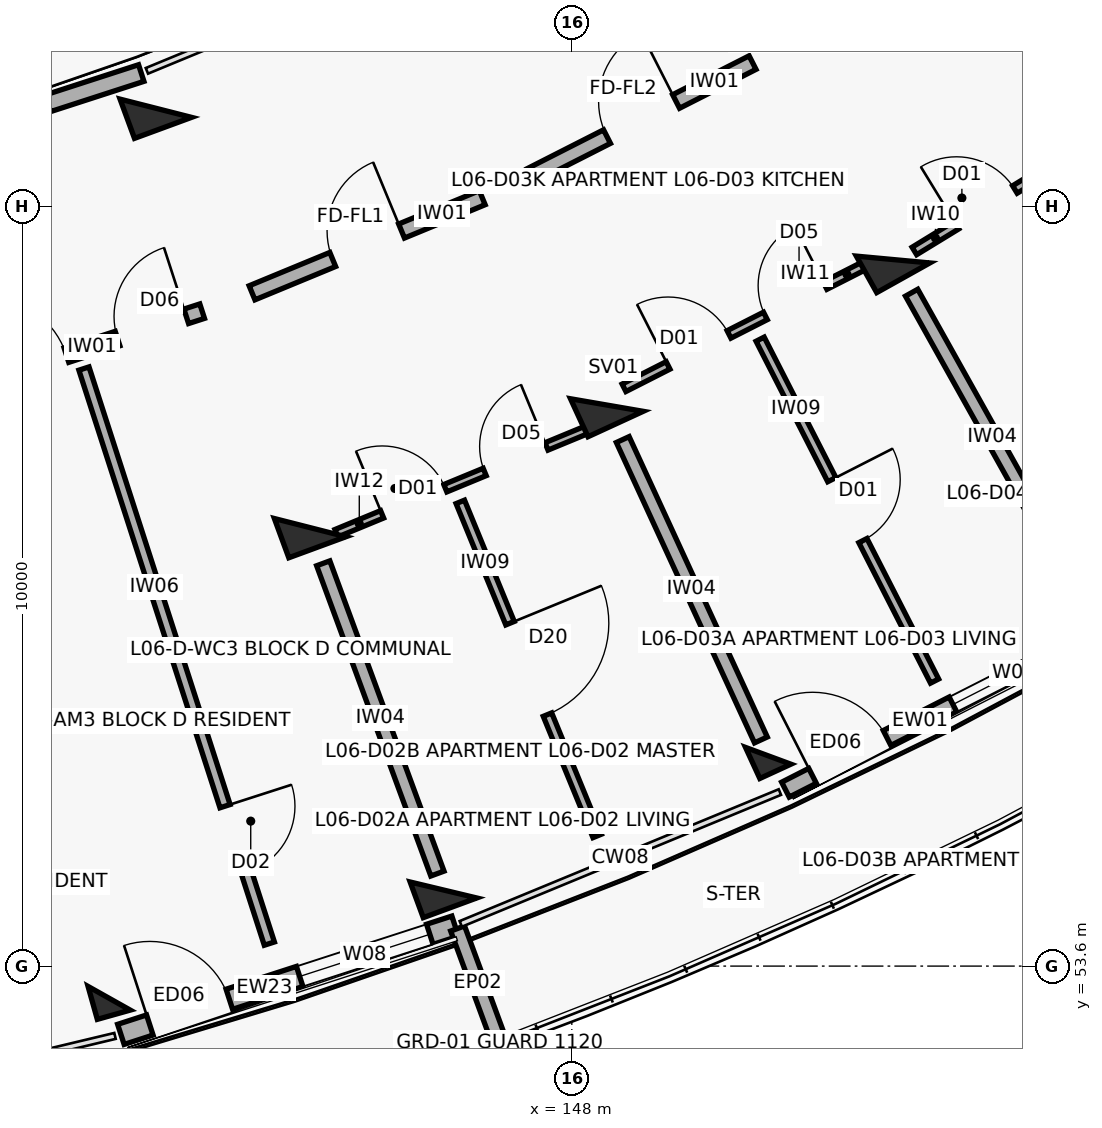
"""IFC4 building model, lengths in metres.
Left out: names, types, materials, properties, quantities, classifications, styles, units other than length and angle.
Written with IfcOpenShell. Run it as: python <this file> out.ifc"""

import sys

from ifc_helpers import new_model, si_unit, direction, frame, frame_2d, origin, origin_2d, place, context, subcontext, project, spatial, rectangle, extrude, element, fill, save


model = new_model("IFC4")
c1 = context("Model", 3, precision=1e-05, world=origin(), true_north=direction((0.0, 1.0)))
c2 = subcontext(c1, "Body", "Model", "MODEL_VIEW")
j1 = project(units=[si_unit("LENGTHUNIT", "METRE"), si_unit("PLANEANGLEUNIT", "RADIAN")], contexts=[c1])
p1 = place(None, origin())
s1 = spatial("IfcSite", under=j1, at=p1, CompositionType="ELEMENT")
p2 = place(p1, origin())
s2 = spatial("IfcBuilding", under=s1, at=p2, CompositionType="ELEMENT")
p3 = place(p2, frame((0.0, 0.0, 20.5)))
s3 = spatial("IfcBuildingStorey", under=s2, at=p3, CompositionType="ELEMENT", Elevation=20.5)
p4 = place(p3, frame((141.913, 53.177, 0.0), z_axis=(0.0, 0.0, 1.0), x_axis=(0.270600445976, -0.962691746426, 0.0)))
e1 = element("IfcColumn", 1, at=p4, inside=s3, PredefinedType="COLUMN", context=c2, shape_type="SweptSolid", body=[
    extrude(rectangle(XDim=0.45, YDim=0.45, at=origin_2d()), origin(), (0.0, 0.0, 1.0), 3.1),
])
for number, where, z_axis, x_axis in (
    (2, (142.527, 64.887, 0.0), (0.0, 0.0, 1.0), (0.345, -0.938, 0.0)),
    (3, (144.557, 59.369, 0.0), (0.0, 0.0, 1.0), (0.345, -0.938, 0.0)),
):
    element("IfcColumn", number, at=place(p3, frame(where, z_axis=z_axis, x_axis=x_axis)), inside=s3, PredefinedType="COLUMN", context=c2, shape_type="SweptSolid", body=[
        extrude(rectangle(XDim=0.55, YDim=0.8, at=origin_2d()), origin(), (0.0, 0.0, 1.0), 3.1),
    ])
p5 = place(p3, frame((146.311, 54.602, 0.0), z_axis=(0.0, 0.0, 1.0), x_axis=(0.345298198999, -0.93849302276, 0.0)))
e4 = element("IfcColumn", 4, at=p5, inside=s3, PredefinedType="COLUMN", context=c2, shape_type="SweptSolid", body=[
    extrude(rectangle(XDim=0.5, YDim=0.75, at=origin_2d()), origin(), (0.0, 0.0, 1.0), 3.1),
])
p6 = place(p3, frame((148.461, 60.982, 0.0), z_axis=(0.0, 0.0, 1.0), x_axis=(0.417867073801, -0.908508177527, 0.0)))
e5 = element("IfcColumn", 5, at=p6, inside=s3, PredefinedType="COLUMN", context=c2, shape_type="SweptSolid", body=[
    extrude(rectangle(XDim=0.55, YDim=0.8, at=origin_2d()), origin(), (0.0, 0.0, 1.0), 3.1),
])
p7 = place(p3, frame((150.584, 56.367, 0.0), z_axis=(0.0, 0.0, 1.0), x_axis=(0.417867073801, -0.908508177527, 0.0)))
e6 = element("IfcColumn", 6, at=p7, inside=s3, PredefinedType="COLUMN", context=c2, shape_type="SweptSolid", body=[
    extrude(rectangle(XDim=0.45, YDim=0.45, at=origin_2d()), origin(), (0.0, 0.0, 1.0), 3.1),
])
p8 = place(p3, frame((152.227, 62.897, 0.0), z_axis=(0.0, 0.0, 1.0), x_axis=(0.487859659139, -0.87292207727, 0.0)))
e7 = element("IfcColumn", 7, at=p8, inside=s3, PredefinedType="COLUMN", context=c2, shape_type="SweptSolid", body=[
    extrude(rectangle(XDim=0.55, YDim=0.8, at=origin_2d()), origin(), (0.0, 0.0, 1.0), 3.1),
])
p9 = place(p3, frame((142.067, 52.701, 0.0), z_axis=(0.0, 0.0, 1.0), x_axis=(0.951311584867, 0.308230868826, 0.0)))
e8 = element("IfcWall", 8, at=p9, inside=s3, PredefinedType="SOLIDWALL", context=c2, shape_type="SweptSolid", body=[
    extrude(rectangle(XDim=4.623, YDim=0.278, at=frame_2d((2.311, 0.0))), origin(), (0.0, 0.0, 1.0), 2.25),
])
p10 = place(p9, frame((0.4, 0.0, 0.0)))
e9 = element("IfcOpeningElement", 9, at=p10, cuts=e8, PredefinedType="OPENING", context=c2, shape_type="SweptSolid", body=[
    extrude(rectangle(XDim=1.1, YDim=2.15, at=frame_2d((0.55, 1.075))), frame((0.0, 0.149, 0.0), z_axis=(0.0, -1.0, 0.0), x_axis=(1.0, 0.0, 0.0)), (0.0, 0.0, 1.0), 0.298),
])
p11 = place(p9, frame((2.472, 0.0, 0.35)))
e10 = element("IfcOpeningElement", 10, at=p11, cuts=e8, PredefinedType="OPENING", context=c2, shape_type="SweptSolid", body=[
    extrude(rectangle(XDim=1.8, YDim=1.65, at=frame_2d((0.9, 0.825))), frame((0.0, 0.149, 0.0), z_axis=(0.0, -1.0, 0.0), x_axis=(1.0, 0.0, 0.0)), (0.0, 0.0, 1.0), 0.298),
])
p12 = place(p3, frame((138.831, 64.215, 0.0), z_axis=(0.0, 0.0, 1.0), x_axis=(0.951320548791, 0.308203201552, 0.0)))
e11 = element("IfcWall", 11, at=p12, inside=s3, PredefinedType="SOLIDWALL", context=c2, shape_type="SweptSolid", body=[
    extrude(rectangle(XDim=3.683, YDim=0.23, at=frame_2d((1.842, 0.0))), origin(), (0.0, 0.0, 1.0), 2.25),
])
p13 = place(p12, frame((1.292, 0.0, 0.0)))
e12 = element("IfcOpeningElement", 12, at=p13, cuts=e11, PredefinedType="OPENING", context=c2, shape_type="SweptSolid", body=[
    extrude(rectangle(XDim=1.1, YDim=2.15, at=frame_2d((0.55, 1.075))), frame((0.0, 0.125, 0.0), z_axis=(0.0, -1.0, 0.0), x_axis=(1.0, 0.0, 0.0)), (0.0, 0.0, 1.0), 0.25),
])
p14 = place(p3, frame((146.498, 54.095, 0.0), z_axis=(0.0, 0.0, 1.0), x_axis=(0.345328180406, -0.938481991206, 0.0)))
e13 = element("IfcWall", 13, at=p14, inside=s3, PredefinedType="PARAPET", context=c2, shape_type="SweptSolid", body=[
    extrude(rectangle(XDim=1.53, YDim=0.195, at=frame_2d((0.765, 0.0))), origin(), (0.0, 0.0, 1.0), 2.25),
])
p15 = place(p3, frame((150.811, 55.922, 0.0), z_axis=(0.0, 0.0, 1.0), x_axis=(0.891407190547, 0.453203288428, 0.0)))
e14 = element("IfcWall", 14, at=p15, inside=s3, PredefinedType="SOLIDWALL", context=c2, shape_type="SweptSolid", body=[
    extrude(rectangle(XDim=4.623, YDim=0.22, at=frame_2d((2.311, 0.0))), origin(), (0.0, 0.0, 1.0), 2.25),
])
p16 = place(p15, frame((0.4, 0.0, 0.0)))
e15 = element("IfcOpeningElement", 15, at=p16, cuts=e14, PredefinedType="OPENING", context=c2, shape_type="SweptSolid", body=[
    extrude(rectangle(XDim=1.1, YDim=2.15, at=frame_2d((0.55, 1.075))), frame((0.0, 0.12, 0.0), z_axis=(0.0, -1.0, 0.0), x_axis=(1.0, 0.0, 0.0)), (0.0, 0.0, 1.0), 0.24),
])
p17 = place(p15, frame((2.472, 0.0, 0.35)))
e16 = element("IfcOpeningElement", 16, at=p17, cuts=e14, PredefinedType="OPENING", context=c2, shape_type="SweptSolid", body=[
    extrude(rectangle(XDim=1.8, YDim=1.65, at=frame_2d((0.9, 0.825))), frame((0.0, 0.12, 0.0), z_axis=(0.0, -1.0, 0.0), x_axis=(1.0, 0.0, 0.0)), (0.0, 0.0, 1.0), 0.24),
])
p18 = place(p3, frame((140.019, 61.208, 0.0), z_axis=(0.0, 0.0, 1.0), x_axis=(0.951323803878, 0.308193154005, 0.0)))
e17 = element("IfcWall", 17, at=p18, inside=s3, PredefinedType="SOLIDWALL", context=c2, shape_type="SweptSolid", body=[
    extrude(rectangle(XDim=3.277, YDim=0.2, at=frame_2d((1.639, 0.0))), origin(), (0.0, 0.0, 1.0), 2.08),
])
p19 = place(p18, frame((0.28, 0.0, 0.0)))
e18 = element("IfcOpeningElement", 18, at=p19, cuts=e17, PredefinedType="OPENING", context=c2, shape_type="SweptSolid", body=[
    extrude(rectangle(XDim=1.12, YDim=2.15, at=frame_2d((0.56, 1.075))), frame((0.0, 0.11, 0.0), z_axis=(0.0, -1.0, 0.0), x_axis=(1.0, 0.0, 0.0)), (0.0, 0.0, 1.0), 0.22),
])
p20 = place(p18, frame((2.107, 0.0, 0.0)))
e19 = element("IfcOpeningElement", 19, at=p20, cuts=e17, PredefinedType="OPENING", context=c2, shape_type="SweptSolid", body=[
    extrude(rectangle(XDim=0.95, YDim=2.1, at=frame_2d((0.475, 1.05))), frame((0.0, 0.11, 0.0), z_axis=(0.0, -1.0, 0.0), x_axis=(1.0, 0.0, 0.0)), (0.0, 0.0, 1.0), 0.22),
])
p21 = place(p3, frame((141.581, 61.462, 0.0), z_axis=(0.0, 0.0, 1.0), x_axis=(0.306824216212, -0.951766200464, 0.0)))
e20 = element("IfcWall", 20, at=p21, inside=s3, PredefinedType="PARTITIONING", context=c2, shape_type="SweptSolid", body=[
    extrude(rectangle(XDim=7.95, YDim=0.14, at=frame_2d((3.975, 0.0))), origin(), (0.0, 0.0, 1.0), 2.08),
])
p22 = place(p21, frame((6.05, 0.0, 0.0)))
e21 = element("IfcOpeningElement", 21, at=p22, cuts=e20, PredefinedType="OPENING", context=c2, shape_type="SweptSolid", body=[
    extrude(rectangle(XDim=0.92, YDim=2.1, at=frame_2d((0.46, 1.05))), frame((0.0, 0.08, 0.0), z_axis=(0.0, -1.0, 0.0), x_axis=(1.0, 0.0, 0.0)), (0.0, 0.0, 1.0), 0.16),
])
p23 = place(p3, frame((143.793, 62.459, 0.0), z_axis=(0.0, 0.0, 1.0), x_axis=(0.924214561665, 0.381873596896, 0.0)))
e22 = element("IfcWall", 22, at=p23, inside=s3, PredefinedType="SOLIDWALL", context=c2, shape_type="SweptSolid", body=[
    extrude(rectangle(XDim=3.277, YDim=0.2, at=frame_2d((1.639, 0.0))), origin(), (0.0, 0.0, 1.0), 2.08),
])
p24 = place(p23, frame((1.148, 0.0, 0.0)))
e23 = element("IfcOpeningElement", 23, at=p24, cuts=e22, PredefinedType="OPENING", context=c2, shape_type="SweptSolid", body=[
    extrude(rectangle(XDim=0.98, YDim=2.15, at=frame_2d((0.49, 1.075))), frame((0.0, 0.11, 0.0), z_axis=(0.0, -1.0, 0.0), x_axis=(1.0, 0.0, 0.0)), (0.0, 0.0, 1.0), 0.22),
])
p25 = place(p3, frame((144.903, 59.296, 0.0), z_axis=(0.0, 0.0, 1.0), x_axis=(0.924207914011, 0.381889685223, 0.0)))
e24 = element("IfcWall", 24, at=p25, inside=s3, PredefinedType="PARTITIONING", context=c2, shape_type="SweptSolid", body=[
    extrude(rectangle(XDim=3.64, YDim=0.105, at=frame_2d((1.82, 0.0))), origin(), (0.0, 0.0, 1.0), 2.08),
])
p26 = place(p25, frame((0.65, 0.0, 0.0)))
e25 = element("IfcOpeningElement", 25, at=p26, cuts=e24, PredefinedType="OPENING", context=c2, shape_type="SweptSolid", body=[
    extrude(rectangle(XDim=0.9, YDim=2.1, at=frame_2d((0.45, 1.05))), frame((0.0, 0.062, 0.0), z_axis=(0.0, -1.0, 0.0), x_axis=(1.0, 0.0, 0.0)), (0.0, 0.0, 1.0), 0.125),
])
p27 = place(p25, frame((2.11, 0.0, 0.0)))
e26 = element("IfcOpeningElement", 26, at=p27, cuts=e24, PredefinedType="OPENING", context=c2, shape_type="SweptSolid", body=[
    extrude(rectangle(XDim=0.88, YDim=2.1, at=frame_2d((0.44, 1.05))), frame((0.0, 0.062, 0.0), z_axis=(0.0, -1.0, 0.0), x_axis=(1.0, 0.0, 0.0)), (0.0, 0.0, 1.0), 0.125),
])
p28 = place(p3, frame((146.533, 59.708, 0.0), z_axis=(0.0, 0.0, 1.0), x_axis=(0.379167145653, -0.925328198888, 0.0)))
e27 = element("IfcWall", 27, at=p28, inside=s3, PredefinedType="PARTITIONING", context=c2, shape_type="SweptSolid", body=[
    extrude(rectangle(XDim=4.75, YDim=0.12, at=frame_2d((2.375, 0.0))), origin(), (0.0, 0.0, 1.0), 2.08),
])
p29 = place(p28, frame((1.725, 0.0, 0.0)))
e28 = element("IfcOpeningElement", 28, at=p29, cuts=e27, PredefinedType="OPENING", context=c2, shape_type="SweptSolid", body=[
    extrude(rectangle(XDim=1.3, YDim=2.1, at=frame_2d((0.65, 1.05))), frame((0.0, 0.07, 0.0), z_axis=(0.0, -1.0, 0.0), x_axis=(1.0, 0.0, 0.0)), (0.0, 0.0, 1.0), 0.14),
])
p30 = place(p3, frame((144.73, 58.9, 0.0), z_axis=(0.0, 0.0, 1.0), x_axis=(0.345273579683, -0.938502080537, 0.0)))
e29 = element("IfcWall", 29, at=p30, inside=s3, PredefinedType="SOLIDWALL", context=c2, shape_type="SweptSolid", body=[
    extrude(rectangle(XDim=4.35, YDim=0.185, at=frame_2d((2.175, 0.0))), origin(), (0.0, 0.0, 1.0), 2.08),
])
p31 = place(p3, frame((147.457, 64.003, 0.0), z_axis=(0.0, 0.0, 1.0), x_axis=(0.891412167565, 0.45319349898, 0.0)))
e30 = element("IfcWall", 30, at=p31, inside=s3, PredefinedType="SOLIDWALL", context=c2, shape_type="SweptSolid", body=[
    extrude(rectangle(XDim=3.277, YDim=0.2, at=frame_2d((1.639, 0.0))), origin(), (0.0, 0.0, 1.0), 2.08),
])
p32 = place(p31, frame((1.128, 0.0, 0.0)))
e31 = element("IfcOpeningElement", 31, at=p32, cuts=e30, PredefinedType="OPENING", context=c2, shape_type="SweptSolid", body=[
    extrude(rectangle(XDim=1.02, YDim=2.15, at=frame_2d((0.51, 1.075))), frame((0.0, 0.11, 0.0), z_axis=(0.0, -1.0, 0.0), x_axis=(1.0, 0.0, 0.0)), (0.0, 0.0, 1.0), 0.22),
])
p33 = place(p3, frame((148.687, 61.209, 0.0), z_axis=(0.0, 0.0, 1.0), x_axis=(0.891396224028, 0.453224857866, 0.0)))
e32 = element("IfcWall", 32, at=p33, inside=s3, PredefinedType="PARTITIONING", context=c2, shape_type="SweptSolid", body=[
    extrude(rectangle(XDim=3.617, YDim=0.11, at=frame_2d((1.808, 0.0))), origin(), (0.0, 0.0, 1.0), 2.08),
])
p34 = place(p33, frame((0.65, 0.0, 0.0)))
e33 = element("IfcOpeningElement", 33, at=p34, cuts=e32, PredefinedType="OPENING", context=c2, shape_type="SweptSolid", body=[
    extrude(rectangle(XDim=0.9, YDim=2.1, at=frame_2d((0.45, 1.05))), frame((0.0, 0.065, 0.0), z_axis=(0.0, -1.0, 0.0), x_axis=(1.0, 0.0, 0.0)), (0.0, 0.0, 1.0), 0.13),
])
p35 = place(p33, frame((2.086, 0.0, 0.0)))
e34 = element("IfcOpeningElement", 34, at=p35, cuts=e32, PredefinedType="OPENING", context=c2, shape_type="SweptSolid", body=[
    extrude(rectangle(XDim=0.88, YDim=2.1, at=frame_2d((0.44, 1.05))), frame((0.0, 0.065, 0.0), z_axis=(0.0, -1.0, 0.0), x_axis=(1.0, 0.0, 0.0)), (0.0, 0.0, 1.0), 0.13),
])
p36 = place(p3, frame((150.478, 61.849, 0.0), z_axis=(0.0, 0.0, 1.0), x_axis=(0.454489129902, -0.890752283635, 0.0)))
e35 = element("IfcWall", 35, at=p36, inside=s3, PredefinedType="PARTITIONING", context=c2, shape_type="SweptSolid", body=[
    extrude(rectangle(XDim=5.05, YDim=0.12, at=frame_2d((2.525, 0.0))), origin(), (0.0, 0.0, 1.0), 2.08),
])
p37 = place(p36, frame((2.075, 0.0, 0.0)))
e36 = element("IfcOpeningElement", 36, at=p37, cuts=e35, PredefinedType="OPENING", context=c2, shape_type="SweptSolid", body=[
    extrude(rectangle(XDim=0.9, YDim=2.1, at=frame_2d((0.45, 1.05))), frame((0.0, 0.07, 0.0), z_axis=(0.0, -1.0, 0.0), x_axis=(1.0, 0.0, 0.0)), (0.0, 0.0, 1.0), 0.14),
])
p38 = place(p3, frame((148.67, 60.528, 0.0), z_axis=(0.0, 0.0, 1.0), x_axis=(0.417837051164, -0.908521985796, 0.0)))
e37 = element("IfcWall", 37, at=p38, inside=s3, PredefinedType="SOLIDWALL", context=c2, shape_type="SweptSolid", body=[
    extrude(rectangle(XDim=4.35, YDim=0.185, at=frame_2d((2.175, 0.0))), origin(), (0.0, 0.0, 1.0), 2.08),
])
p39 = place(p3, frame((152.507, 63.01, 0.0), z_axis=(0.0, 0.0, 1.0), x_axis=(0.853110474662, 0.521730311581, 0.0)))
e38 = element("IfcWall", 38, at=p39, inside=s3, PredefinedType="PARTITIONING", context=c2, shape_type="SweptSolid", body=[
    extrude(rectangle(XDim=3.628, YDim=0.115, at=frame_2d((1.814, 0.0))), origin(), (0.0, 0.0, 1.0), 2.08),
])
p40 = place(p39, frame((0.65, 0.0, 0.0)))
e39 = element("IfcOpeningElement", 39, at=p40, cuts=e38, PredefinedType="OPENING", context=c2, shape_type="SweptSolid", body=[
    extrude(rectangle(XDim=0.9, YDim=2.1, at=frame_2d((0.45, 1.05))), frame((0.0, 0.067, 0.0), z_axis=(0.0, -1.0, 0.0), x_axis=(1.0, 0.0, 0.0)), (0.0, 0.0, 1.0), 0.135),
])
p41 = place(p39, frame((2.098, 0.0, 0.0)))
e40 = element("IfcOpeningElement", 40, at=p41, cuts=e38, PredefinedType="OPENING", context=c2, shape_type="SweptSolid", body=[
    extrude(rectangle(XDim=0.88, YDim=2.1, at=frame_2d((0.44, 1.05))), frame((0.0, 0.067, 0.0), z_axis=(0.0, -1.0, 0.0), x_axis=(1.0, 0.0, 0.0)), (0.0, 0.0, 1.0), 0.135),
])
p42 = place(p3, frame((152.471, 62.46, 0.0), z_axis=(0.0, 0.0, 1.0), x_axis=(0.487866639184, -0.872918176218, 0.0)))
e41 = element("IfcWall", 41, at=p42, inside=s3, PredefinedType="SOLIDWALL", context=c2, shape_type="SweptSolid", body=[
    extrude(rectangle(XDim=4.35, YDim=0.185, at=frame_2d((2.175, 0.0))), origin(), (0.0, 0.0, 1.0), 2.08),
])
p43 = place(p10, origin())
e42 = element("IfcDoor", 42, at=p43, inside=s3, OperationType="SINGLE_SWING_LEFT", PredefinedType="DOOR", context=c2, shape_type="SweptSolid", body=[
    extrude(rectangle(XDim=1.1, YDim=2.15, at=frame_2d((0.55, 1.075))), frame((0.0, 0.025, 0.0), z_axis=(0.0, -1.0, 0.0), x_axis=(1.0, 0.0, 0.0)), (0.0, 0.0, 1.0), 0.05),
])
fill(e9, e42)
p44 = place(p11, origin())
e43 = element("IfcWindow", 43, at=p44, inside=s3, PartitioningType="TRIPLE_PANEL_VERTICAL", PredefinedType="WINDOW", context=c2, shape_type="SweptSolid", body=[
    extrude(rectangle(XDim=1.8, YDim=1.65, at=frame_2d((0.9, 0.825))), frame((0.0, 0.03, 0.0), z_axis=(0.0, -1.0, 0.0), x_axis=(1.0, 0.0, 0.0)), (0.0, 0.0, 1.0), 0.06),
])
fill(e10, e43)
p45 = place(p16, origin())
e44 = element("IfcDoor", 44, at=p45, inside=s3, OperationType="SINGLE_SWING_LEFT", PredefinedType="DOOR", context=c2, shape_type="SweptSolid", body=[
    extrude(rectangle(XDim=1.1, YDim=2.15, at=frame_2d((0.55, 1.075))), frame((0.0, 0.025, 0.0), z_axis=(0.0, -1.0, 0.0), x_axis=(1.0, 0.0, 0.0)), (0.0, 0.0, 1.0), 0.05),
])
fill(e15, e44)
p46 = place(p17, origin())
e45 = element("IfcWindow", 45, at=p46, inside=s3, PartitioningType="TRIPLE_PANEL_VERTICAL", PredefinedType="WINDOW", context=c2, shape_type="SweptSolid", body=[
    extrude(rectangle(XDim=1.8, YDim=1.65, at=frame_2d((0.9, 0.825))), frame((0.0, 0.03, 0.0), z_axis=(0.0, -1.0, 0.0), x_axis=(1.0, 0.0, 0.0)), (0.0, 0.0, 1.0), 0.06),
])
fill(e16, e45)
p47 = place(p19, origin())
e46 = element("IfcDoor", 46, at=p47, inside=s3, OperationType="SINGLE_SWING_LEFT", PredefinedType="DOOR", context=c2, shape_type="SweptSolid", body=[
    extrude(rectangle(XDim=1.12, YDim=2.15, at=frame_2d((0.56, 1.075))), frame((0.0, 0.025, 0.0), z_axis=(0.0, -1.0, 0.0), x_axis=(1.0, 0.0, 0.0)), (0.0, 0.0, 1.0), 0.05),
])
fill(e18, e46)
p48 = place(p20, origin())
e47 = element("IfcDoor", 47, at=p48, inside=s3, OperationType="SINGLE_SWING_RIGHT", PredefinedType="DOOR", context=c2, shape_type="SweptSolid", body=[
    extrude(rectangle(XDim=0.95, YDim=2.1, at=frame_2d((0.475, 1.05))), frame((0.0, 0.025, 0.0), z_axis=(0.0, -1.0, 0.0), x_axis=(1.0, 0.0, 0.0)), (0.0, 0.0, 1.0), 0.05),
])
fill(e19, e47)
p49 = place(p22, origin())
e48 = element("IfcDoor", 48, at=p49, inside=s3, OperationType="SINGLE_SWING_LEFT", PredefinedType="DOOR", context=c2, shape_type="SweptSolid", body=[
    extrude(rectangle(XDim=0.92, YDim=2.1, at=frame_2d((0.46, 1.05))), frame((0.0, 0.025, 0.0), z_axis=(0.0, -1.0, 0.0), x_axis=(1.0, 0.0, 0.0)), (0.0, 0.0, 1.0), 0.05),
])
fill(e21, e48)
p50 = place(p24, origin())
e49 = element("IfcDoor", 49, at=p50, inside=s3, OperationType="SINGLE_SWING_RIGHT", PredefinedType="DOOR", context=c2, shape_type="SweptSolid", body=[
    extrude(rectangle(XDim=0.98, YDim=2.15, at=frame_2d((0.49, 1.075))), frame((0.0, 0.025, 0.0), z_axis=(0.0, -1.0, 0.0), x_axis=(1.0, 0.0, 0.0)), (0.0, 0.0, 1.0), 0.05),
])
fill(e23, e49)
p51 = place(p26, origin())
e50 = element("IfcDoor", 50, at=p51, inside=s3, OperationType="SINGLE_SWING_LEFT", PredefinedType="DOOR", context=c2, shape_type="SweptSolid", body=[
    extrude(rectangle(XDim=0.9, YDim=2.1, at=frame_2d((0.45, 1.05))), frame((0.0, 0.025, 0.0), z_axis=(0.0, -1.0, 0.0), x_axis=(1.0, 0.0, 0.0)), (0.0, 0.0, 1.0), 0.05),
])
fill(e25, e50)
p52 = place(p27, origin())
e51 = element("IfcDoor", 51, at=p52, inside=s3, OperationType="SINGLE_SWING_RIGHT", PredefinedType="DOOR", context=c2, shape_type="SweptSolid", body=[
    extrude(rectangle(XDim=0.88, YDim=2.1, at=frame_2d((0.44, 1.05))), frame((0.0, 0.025, 0.0), z_axis=(0.0, -1.0, 0.0), x_axis=(1.0, 0.0, 0.0)), (0.0, 0.0, 1.0), 0.05),
])
fill(e26, e51)
p53 = place(p29, origin())
e52 = element("IfcDoor", 52, at=p53, inside=s3, OperationType="SINGLE_SWING_LEFT", PredefinedType="DOOR", context=c2, shape_type="SweptSolid", body=[
    extrude(rectangle(XDim=1.3, YDim=2.1, at=frame_2d((0.65, 1.05))), frame((0.0, 0.025, 0.0), z_axis=(0.0, -1.0, 0.0), x_axis=(1.0, 0.0, 0.0)), (0.0, 0.0, 1.0), 0.05),
])
fill(e28, e52)
p54 = place(p32, origin())
e53 = element("IfcDoor", 53, at=p54, inside=s3, OperationType="SINGLE_SWING_RIGHT", PredefinedType="DOOR", context=c2, shape_type="SweptSolid", body=[
    extrude(rectangle(XDim=1.02, YDim=2.15, at=frame_2d((0.51, 1.075))), frame((0.0, 0.025, 0.0), z_axis=(0.0, -1.0, 0.0), x_axis=(1.0, 0.0, 0.0)), (0.0, 0.0, 1.0), 0.05),
])
fill(e31, e53)
p55 = place(p34, origin())
e54 = element("IfcDoor", 54, at=p55, inside=s3, OperationType="SINGLE_SWING_LEFT", PredefinedType="DOOR", context=c2, shape_type="SweptSolid", body=[
    extrude(rectangle(XDim=0.9, YDim=2.1, at=frame_2d((0.45, 1.05))), frame((0.0, 0.025, 0.0), z_axis=(0.0, -1.0, 0.0), x_axis=(1.0, 0.0, 0.0)), (0.0, 0.0, 1.0), 0.05),
])
fill(e33, e54)
p56 = place(p35, origin())
e55 = element("IfcDoor", 55, at=p56, inside=s3, OperationType="SINGLE_SWING_RIGHT", PredefinedType="DOOR", context=c2, shape_type="SweptSolid", body=[
    extrude(rectangle(XDim=0.88, YDim=2.1, at=frame_2d((0.44, 1.05))), frame((0.0, 0.025, 0.0), z_axis=(0.0, -1.0, 0.0), x_axis=(1.0, 0.0, 0.0)), (0.0, 0.0, 1.0), 0.05),
])
fill(e34, e55)
p57 = place(p37, origin())
e56 = element("IfcDoor", 56, at=p57, inside=s3, OperationType="SINGLE_SWING_LEFT", PredefinedType="DOOR", context=c2, shape_type="SweptSolid", body=[
    extrude(rectangle(XDim=0.9, YDim=2.1, at=frame_2d((0.45, 1.05))), frame((0.0, 0.025, 0.0), z_axis=(0.0, -1.0, 0.0), x_axis=(1.0, 0.0, 0.0)), (0.0, 0.0, 1.0), 0.05),
])
fill(e36, e56)
p58 = place(p40, origin())
e57 = element("IfcDoor", 57, at=p58, inside=s3, OperationType="SINGLE_SWING_LEFT", PredefinedType="DOOR", context=c2, shape_type="SweptSolid", body=[
    extrude(rectangle(XDim=0.9, YDim=2.1, at=frame_2d((0.45, 1.05))), frame((0.0, 0.025, 0.0), z_axis=(0.0, -1.0, 0.0), x_axis=(1.0, 0.0, 0.0)), (0.0, 0.0, 1.0), 0.05),
])
fill(e39, e57)
save(model, sys.argv[1])
